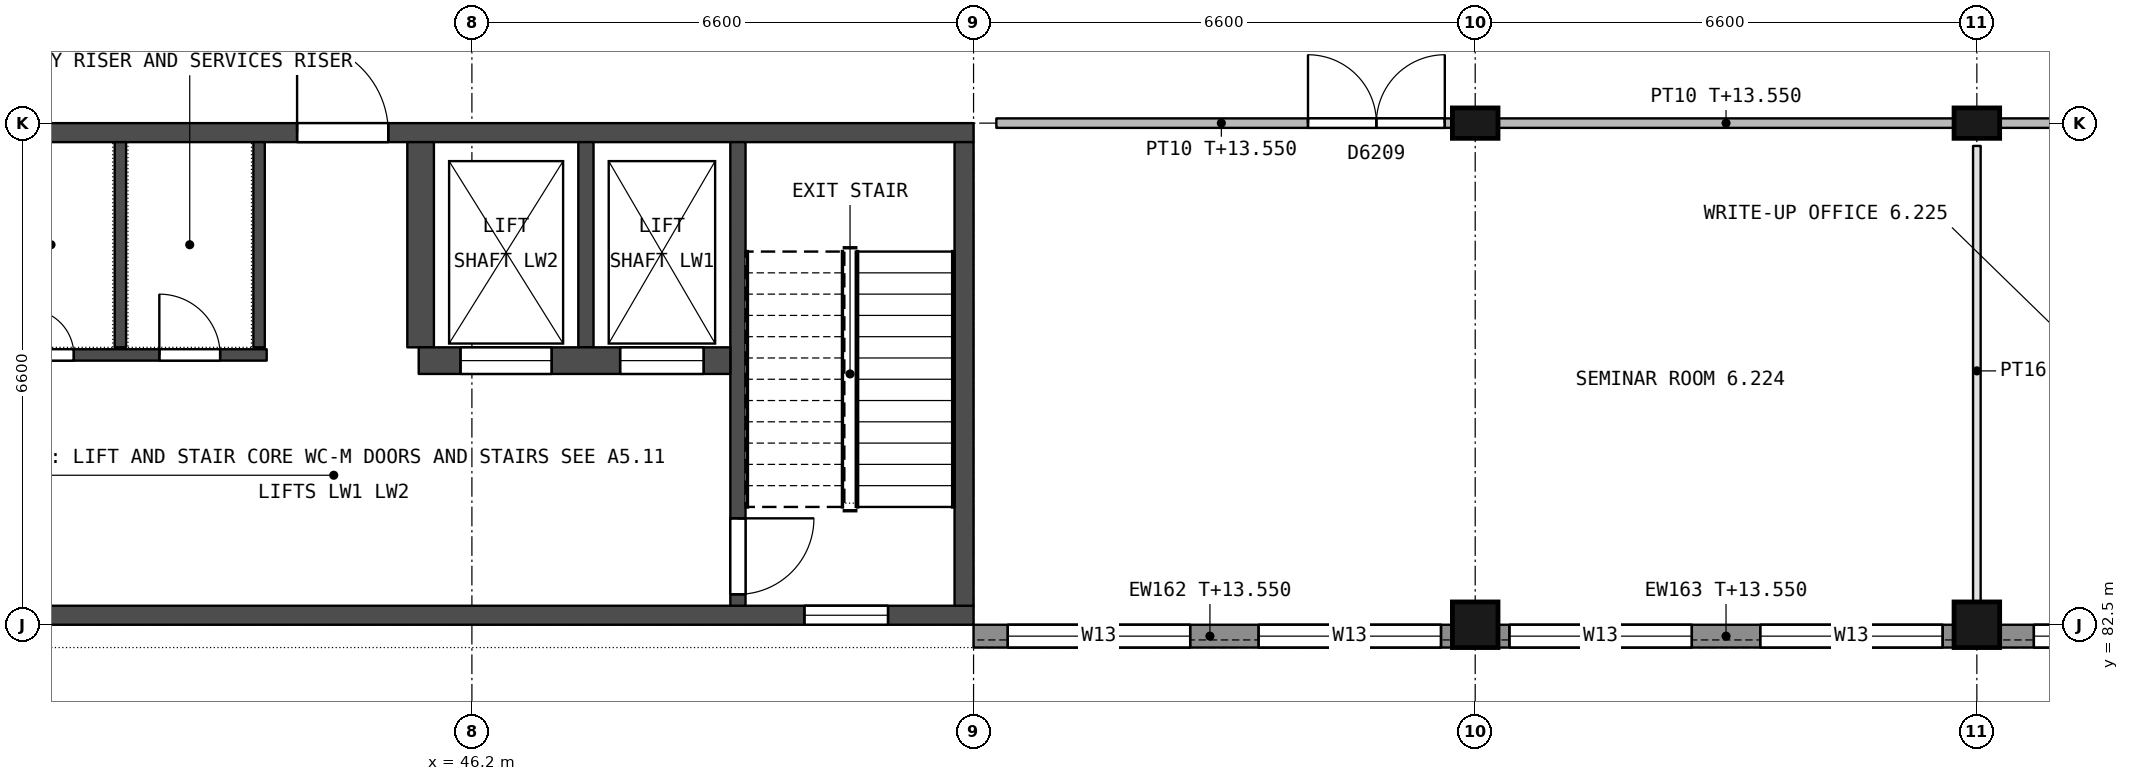
"""IFC4 building model, lengths in metres.
Left out: names, types, materials, properties, quantities, classifications, styles, units other than length and angle.
Written with IfcOpenShell. Run it as: python <this file> out.ifc"""

import sys

from ifc_helpers import new_model, si_unit, direction, frame, frame_2d, origin, origin_2d, place, context, subcontext, project, spatial, rectangle, extrude, element, fill, save


model = new_model("IFC4")
c1 = context("Model", 3, precision=1e-05, world=origin(), true_north=direction((0.0, 1.0)))
c2 = subcontext(c1, "Body", "Model", "MODEL_VIEW")
j1 = project(units=[si_unit("LENGTHUNIT", "METRE"), si_unit("PLANEANGLEUNIT", "RADIAN")], contexts=[c1])
p1 = place(None, origin())
s1 = spatial("IfcSite", under=j1, at=p1, CompositionType="ELEMENT")
p2 = place(p1, origin())
s2 = spatial("IfcBuilding", under=s1, at=p2, CompositionType="ELEMENT")
p3 = place(p2, frame((0.0, 0.0, 9.9)))
s3 = spatial("IfcBuildingStorey", under=s2, at=p3, CompositionType="ELEMENT", Elevation=9.9)
p4 = place(p3, frame((59.4, 82.5, 0.0), z_axis=(0.0, 0.0, 1.0), x_axis=(1.0, 0.0, 0.0)))
e1 = element("IfcColumn", 1, at=p4, inside=s3, PredefinedType="COLUMN", context=c2, shape_type="SweptSolid", body=[
    extrude(rectangle(XDim=0.6, YDim=0.6, at=origin_2d()), origin(), (0.0, 0.0, 1.0), 4.5),
])
p5 = place(p3, frame((59.4, 89.1, 0.0), z_axis=(0.0, 0.0, 1.0), x_axis=(1.0, 0.0, 0.0)))
e2 = element("IfcColumn", 2, at=p5, inside=s3, PredefinedType="COLUMN", context=c2, shape_type="SweptSolid", body=[
    extrude(rectangle(XDim=0.6, YDim=0.4, at=origin_2d()), origin(), (0.0, 0.0, 1.0), 4.5),
])
p6 = place(p3, frame((66.0, 82.5, 0.0), z_axis=(0.0, 0.0, 1.0), x_axis=(1.0, 0.0, 0.0)))
e3 = element("IfcColumn", 3, at=p6, inside=s3, PredefinedType="COLUMN", context=c2, shape_type="SweptSolid", body=[
    extrude(rectangle(XDim=0.6, YDim=0.6, at=origin_2d()), origin(), (0.0, 0.0, 1.0), 4.5),
])
p7 = place(p3, frame((66.0, 89.1, 0.0), z_axis=(0.0, 0.0, 1.0), x_axis=(1.0, 0.0, 0.0)))
e4 = element("IfcColumn", 4, at=p7, inside=s3, PredefinedType="COLUMN", context=c2, shape_type="SweptSolid", body=[
    extrude(rectangle(XDim=0.6, YDim=0.4, at=origin_2d()), origin(), (0.0, 0.0, 1.0), 4.5),
])
p8 = place(p3, frame((52.8, 88.975, 0.0), z_axis=(0.0, 0.0, 1.0), x_axis=(-1.0, 0.0, 0.0)))
e5 = element("IfcWall", 5, at=p8, inside=s3, PredefinedType="SHEAR", context=c2, shape_type="SweptSolid", body=[
    extrude(rectangle(XDim=13.2, YDim=0.25, at=frame_2d((6.6, 0.0))), origin(), (0.0, 0.0, 1.0), 4.25),
])
p9 = place(p8, frame((7.7, 0.0, 0.0)))
e6 = element("IfcOpeningElement", 6, at=p9, cuts=e5, PredefinedType="OPENING", context=c2, shape_type="SweptSolid", body=[
    extrude(rectangle(XDim=1.2, YDim=2.1, at=frame_2d((0.6, 1.05))), frame((0.0, 0.135, 0.0), z_axis=(0.0, -1.0, 0.0), x_axis=(1.0, 0.0, 0.0)), (0.0, 0.0, 1.0), 0.27),
])
p10 = place(p3, frame((52.8, 82.625, 0.0), z_axis=(0.0, 0.0, 1.0), x_axis=(-1.0, 0.0, 0.0)))
e7 = element("IfcWall", 7, at=p10, inside=s3, PredefinedType="SHEAR", context=c2, shape_type="SweptSolid", body=[
    extrude(rectangle(XDim=13.2, YDim=0.25, at=frame_2d((6.6, 0.0))), origin(), (0.0, 0.0, 1.0), 4.25),
])
p11 = place(p10, frame((1.125, 0.0, 0.7)))
e8 = element("IfcOpeningElement", 8, at=p11, cuts=e7, PredefinedType="OPENING", context=c2, shape_type="SweptSolid", body=[
    extrude(rectangle(XDim=1.1, YDim=1.5, at=frame_2d((0.55, 0.75))), frame((0.0, 0.135, 0.0), z_axis=(0.0, -1.0, 0.0), x_axis=(1.0, 0.0, 0.0)), (0.0, 0.0, 1.0), 0.27),
])
p12 = place(p3, frame((52.675, 88.85, 0.0), z_axis=(0.0, 0.0, 1.0), x_axis=(0.0, -1.0, 0.0)))
e9 = element("IfcWall", 9, at=p12, inside=s3, PredefinedType="SHEAR", context=c2, shape_type="SweptSolid", body=[
    extrude(rectangle(XDim=6.1, YDim=0.25, at=frame_2d((3.05, 0.0))), origin(), (0.0, 0.0, 1.0), 4.25),
])
p13 = place(p3, frame((49.7, 88.85, 0.0), z_axis=(0.0, 0.0, 1.0), x_axis=(0.0, -1.0, 0.0)))
e10 = element("IfcWall", 10, at=p13, inside=s3, PredefinedType="SHEAR", context=c2, shape_type="SweptSolid", body=[
    extrude(rectangle(XDim=6.1, YDim=0.2, at=frame_2d((3.05, 0.0))), origin(), (0.0, 0.0, 1.0), 4.25),
])
p14 = place(p13, frame((4.95, 0.0, 0.0)))
e11 = element("IfcOpeningElement", 11, at=p14, cuts=e10, PredefinedType="OPENING", context=c2, shape_type="SweptSolid", body=[
    extrude(rectangle(XDim=1.0, YDim=2.2, at=frame_2d((0.5, 1.1))), frame((0.0, 0.11, 0.0), z_axis=(0.0, -1.0, 0.0), x_axis=(1.0, 0.0, 0.0)), (0.0, 0.0, 1.0), 0.22),
])
p15 = place(p3, frame((47.7, 88.85, 0.0), z_axis=(0.0, 0.0, 1.0), x_axis=(0.0, -1.0, 0.0)))
e12 = element("IfcWall", 12, at=p15, inside=s3, PredefinedType="SHEAR", context=c2, shape_type="SweptSolid", body=[
    extrude(rectangle(XDim=2.7, YDim=0.2, at=frame_2d((1.35, 0.0))), origin(), (0.0, 0.0, 1.0), 4.25),
])
p16 = place(p3, frame((45.525, 88.85, 0.0), z_axis=(0.0, 0.0, 1.0), x_axis=(0.0, -1.0, 0.0)))
e13 = element("IfcWall", 13, at=p16, inside=s3, PredefinedType="SHEAR", context=c2, shape_type="SweptSolid", body=[
    extrude(rectangle(XDim=2.7, YDim=0.35, at=frame_2d((1.35, 0.0))), origin(), (0.0, 0.0, 1.0), 4.25),
])
p17 = place(p3, frame((49.6, 85.975, 0.0), z_axis=(0.0, 0.0, 1.0), x_axis=(-1.0, 0.0, 0.0)))
e14 = element("IfcWall", 14, at=p17, inside=s3, PredefinedType="SHEAR", context=c2, shape_type="SweptSolid", body=[
    extrude(rectangle(XDim=4.1, YDim=0.35, at=frame_2d((2.05, 0.0))), origin(), (0.0, 0.0, 1.0), 4.25),
])
p18 = place(p17, frame((0.35, 0.0, 0.0)))
e15 = element("IfcOpeningElement", 15, at=p18, cuts=e14, PredefinedType="OPENING", context=c2, shape_type="SweptSolid", body=[
    extrude(rectangle(XDim=1.1, YDim=2.2, at=frame_2d((0.55, 1.1))), frame((0.0, 0.185, 0.0), z_axis=(0.0, -1.0, 0.0), x_axis=(1.0, 0.0, 0.0)), (0.0, 0.0, 1.0), 0.37),
])
p19 = place(p17, frame((2.35, 0.0, 0.0)))
e16 = element("IfcOpeningElement", 16, at=p19, cuts=e14, PredefinedType="OPENING", context=c2, shape_type="SweptSolid", body=[
    extrude(rectangle(XDim=1.2, YDim=2.3, at=frame_2d((0.6, 1.15))), frame((0.0, 0.185, 0.0), z_axis=(0.0, -1.0, 0.0), x_axis=(1.0, 0.0, 0.0)), (0.0, 0.0, 1.0), 0.37),
])
p20 = place(p3, frame((43.4, 88.85, 0.0), z_axis=(0.0, 0.0, 1.0), x_axis=(0.0, -1.0, 0.0)))
e17 = element("IfcWall", 17, at=p20, inside=s3, PredefinedType="SHEAR", context=c2, shape_type="SweptSolid", body=[
    extrude(rectangle(XDim=2.7, YDim=0.15, at=frame_2d((1.35, 0.0))), origin(), (0.0, 0.0, 1.0), 4.25),
])
p21 = place(p3, frame((43.5, 86.05, 0.0), z_axis=(0.0, 0.0, 1.0), x_axis=(-1.0, 0.0, 0.0)))
e18 = element("IfcWall", 18, at=p21, inside=s3, PredefinedType="SHEAR", context=c2, shape_type="SweptSolid", body=[
    extrude(rectangle(XDim=3.65, YDim=0.15, at=frame_2d((1.825, 0.0))), origin(), (0.0, 0.0, 1.0), 4.25),
])
p22 = place(p21, frame((0.613, 0.0, 0.0)))
e19 = element("IfcOpeningElement", 19, at=p22, cuts=e18, PredefinedType="OPENING", context=c2, shape_type="SweptSolid", body=[
    extrude(rectangle(XDim=0.8, YDim=2.0, at=frame_2d((0.4, 1.0))), frame((0.0, 0.085, 0.0), z_axis=(0.0, -1.0, 0.0), x_axis=(1.0, 0.0, 0.0)), (0.0, 0.0, 1.0), 0.17),
])
p23 = place(p21, frame((2.538, 0.0, 0.0)))
e20 = element("IfcOpeningElement", 20, at=p23, cuts=e18, PredefinedType="OPENING", context=c2, shape_type="SweptSolid", body=[
    extrude(rectangle(XDim=0.6, YDim=2.1, at=frame_2d((0.3, 1.05))), frame((0.0, 0.085, 0.0), z_axis=(0.0, -1.0, 0.0), x_axis=(1.0, 0.0, 0.0)), (0.0, 0.0, 1.0), 0.17),
])
p24 = place(p3, frame((41.575, 88.85, 0.0), z_axis=(0.0, 0.0, 1.0), x_axis=(0.0, -1.0, 0.0)))
e21 = element("IfcWall", 21, at=p24, inside=s3, PredefinedType="SHEAR", context=c2, shape_type="SweptSolid", body=[
    extrude(rectangle(XDim=2.7, YDim=0.15, at=frame_2d((1.35, 0.0))), origin(), (0.0, 0.0, 1.0), 4.25),
])
p25 = place(p3, frame((59.1, 82.35, 0.0), z_axis=(0.0, 0.0, 1.0), x_axis=(-1.0, 0.0, 0.0)))
e22 = element("IfcWall", 22, at=p25, inside=s3, PredefinedType="STANDARD", context=c2, shape_type="SweptSolid", body=[
    extrude(rectangle(XDim=6.3, YDim=0.3, at=frame_2d((3.15, 0.0))), origin(), (0.0, 0.0, 1.0), 3.65),
])
p26 = place(p25, frame((3.45, 0.0, 0.9)))
e23 = element("IfcOpeningElement", 23, at=p26, cuts=e22, PredefinedType="OPENING", context=c2, shape_type="SweptSolid", body=[
    extrude(rectangle(XDim=2.4, YDim=1.8, at=frame_2d((1.2, 0.9))), frame((0.0, 0.16, 0.0), z_axis=(0.0, -1.0, 0.0), x_axis=(1.0, 0.0, 0.0)), (0.0, 0.0, 1.0), 0.32),
])
p27 = place(p25, frame((0.15, 0.0, 0.9)))
e24 = element("IfcOpeningElement", 24, at=p27, cuts=e22, PredefinedType="OPENING", context=c2, shape_type="SweptSolid", body=[
    extrude(rectangle(XDim=2.4, YDim=1.8, at=frame_2d((1.2, 0.9))), frame((0.0, 0.16, 0.0), z_axis=(0.0, -1.0, 0.0), x_axis=(1.0, 0.0, 0.0)), (0.0, 0.0, 1.0), 0.32),
])
p28 = place(p3, frame((65.7, 82.35, 0.0), z_axis=(0.0, 0.0, 1.0), x_axis=(-1.0, 0.0, 0.0)))
e25 = element("IfcWall", 25, at=p28, inside=s3, PredefinedType="STANDARD", context=c2, shape_type="SweptSolid", body=[
    extrude(rectangle(XDim=6.0, YDim=0.3, at=frame_2d((3.0, 0.0))), origin(), (0.0, 0.0, 1.0), 3.65),
])
p29 = place(p28, frame((3.45, 0.0, 0.9)))
e26 = element("IfcOpeningElement", 26, at=p29, cuts=e25, PredefinedType="OPENING", context=c2, shape_type="SweptSolid", body=[
    extrude(rectangle(XDim=2.4, YDim=1.8, at=frame_2d((1.2, 0.9))), frame((0.0, 0.16, 0.0), z_axis=(0.0, -1.0, 0.0), x_axis=(1.0, 0.0, 0.0)), (0.0, 0.0, 1.0), 0.32),
])
p30 = place(p28, frame((0.15, 0.0, 0.9)))
e27 = element("IfcOpeningElement", 27, at=p30, cuts=e25, PredefinedType="OPENING", context=c2, shape_type="SweptSolid", body=[
    extrude(rectangle(XDim=2.4, YDim=1.8, at=frame_2d((1.2, 0.9))), frame((0.0, 0.16, 0.0), z_axis=(0.0, -1.0, 0.0), x_axis=(1.0, 0.0, 0.0)), (0.0, 0.0, 1.0), 0.32),
])
p31 = place(p3, frame((72.3, 82.35, 0.0), z_axis=(0.0, 0.0, 1.0), x_axis=(-1.0, 0.0, 0.0)))
e28 = element("IfcWall", 28, at=p31, inside=s3, PredefinedType="STANDARD", context=c2, shape_type="SweptSolid", body=[
    extrude(rectangle(XDim=6.0, YDim=0.3, at=frame_2d((3.0, 0.0))), origin(), (0.0, 0.0, 1.0), 3.65),
])
p32 = place(p31, frame((3.75, 0.0, 0.9)))
e29 = element("IfcOpeningElement", 29, at=p32, cuts=e28, PredefinedType="OPENING", context=c2, shape_type="SweptSolid", body=[
    extrude(rectangle(XDim=1.8, YDim=1.5, at=frame_2d((0.9, 0.75))), frame((0.0, 0.16, 0.0), z_axis=(0.0, -1.0, 0.0), x_axis=(1.0, 0.0, 0.0)), (0.0, 0.0, 1.0), 0.32),
])
p33 = place(p31, frame((0.45, 0.0, 0.9)))
e30 = element("IfcOpeningElement", 30, at=p33, cuts=e28, PredefinedType="OPENING", context=c2, shape_type="SweptSolid", body=[
    extrude(rectangle(XDim=1.8, YDim=1.5, at=frame_2d((0.9, 0.75))), frame((0.0, 0.16, 0.0), z_axis=(0.0, -1.0, 0.0), x_axis=(1.0, 0.0, 0.0)), (0.0, 0.0, 1.0), 0.32),
])
p34 = place(p3, frame((53.1, 89.1, 0.0), z_axis=(0.0, 0.0, 1.0), x_axis=(1.0, 0.0, 0.0)))
e31 = element("IfcWall", 31, at=p34, inside=s3, PredefinedType="PARTITIONING", context=c2, shape_type="SweptSolid", body=[
    extrude(rectangle(XDim=6.0, YDim=0.125, at=frame_2d((3.0, 0.0))), origin(), (0.0, 0.0, 1.0), 3.65),
])
p35 = place(p34, frame((4.1, 0.0, 0.0)))
e32 = element("IfcOpeningElement", 32, at=p35, cuts=e31, PredefinedType="OPENING", context=c2, shape_type="SweptSolid", body=[
    extrude(rectangle(XDim=1.8, YDim=2.1, at=frame_2d((0.9, 1.05))), frame((0.0, 0.073, 0.0), z_axis=(0.0, -1.0, 0.0), x_axis=(1.0, 0.0, 0.0)), (0.0, 0.0, 1.0), 0.145),
])
p36 = place(p3, frame((59.7, 89.1, 0.0), z_axis=(0.0, 0.0, 1.0), x_axis=(1.0, 0.0, 0.0)))
e33 = element("IfcWall", 33, at=p36, inside=s3, PredefinedType="PARTITIONING", context=c2, shape_type="SweptSolid", body=[
    extrude(rectangle(XDim=6.0, YDim=0.125, at=frame_2d((3.0, 0.0))), origin(), (0.0, 0.0, 1.0), 3.65),
])
p37 = place(p3, frame((72.3, 89.1, 0.0), z_axis=(0.0, 0.0, 1.0), x_axis=(-1.0, 0.0, 0.0)))
e34 = element("IfcWall", 34, at=p37, inside=s3, PredefinedType="PARTITIONING", context=c2, shape_type="SweptSolid", body=[
    extrude(rectangle(XDim=6.0, YDim=0.125, at=frame_2d((3.0, 0.0))), origin(), (0.0, 0.0, 1.0), 3.65),
])
p38 = place(p37, frame((4.2, 0.0, 0.0)))
e35 = element("IfcOpeningElement", 35, at=p38, cuts=e34, PredefinedType="OPENING", context=c2, shape_type="SweptSolid", body=[
    extrude(rectangle(XDim=0.9, YDim=2.1, at=frame_2d((0.45, 1.05))), frame((0.0, 0.073, 0.0), z_axis=(0.0, -1.0, 0.0), x_axis=(1.0, 0.0, 0.0)), (0.0, 0.0, 1.0), 0.145),
])
p39 = place(p37, frame((0.9, 0.0, 0.0)))
e36 = element("IfcOpeningElement", 36, at=p39, cuts=e34, PredefinedType="OPENING", context=c2, shape_type="SweptSolid", body=[
    extrude(rectangle(XDim=0.9, YDim=2.1, at=frame_2d((0.45, 1.05))), frame((0.0, 0.073, 0.0), z_axis=(0.0, -1.0, 0.0), x_axis=(1.0, 0.0, 0.0)), (0.0, 0.0, 1.0), 0.145),
])
p40 = place(p3, frame((66.0, 82.8, 0.0), z_axis=(0.0, 0.0, 1.0), x_axis=(0.0, 1.0, 0.0)))
e37 = element("IfcWall", 37, at=p40, inside=s3, PredefinedType="PARTITIONING", context=c2, shape_type="SweptSolid", body=[
    extrude(rectangle(XDim=6.0, YDim=0.1, at=frame_2d((3.0, 0.0))), origin(), (0.0, 0.0, 1.0), 3.55),
])
p41 = place(p9, origin())
e38 = element("IfcDoor", 38, at=p41, inside=s3, OperationType="SINGLE_SWING_RIGHT", PredefinedType="DOOR", context=c2, shape_type="SweptSolid", body=[
    extrude(rectangle(XDim=1.2, YDim=2.1, at=frame_2d((0.6, 1.05))), frame((0.0, 0.025, 0.0), z_axis=(0.0, -1.0, 0.0), x_axis=(1.0, 0.0, 0.0)), (0.0, 0.0, 1.0), 0.05),
])
fill(e6, e38)
p42 = place(p22, origin())
e39 = element("IfcDoor", 39, at=p42, inside=s3, OperationType="SINGLE_SWING_RIGHT", PredefinedType="DOOR", context=c2, shape_type="SweptSolid", body=[
    extrude(rectangle(XDim=0.8, YDim=2.0, at=frame_2d((0.4, 1.0))), frame((0.0, 0.025, 0.0), z_axis=(0.0, -1.0, 0.0), x_axis=(1.0, 0.0, 0.0)), (0.0, 0.0, 1.0), 0.05),
])
fill(e19, e39)
p43 = place(p23, origin())
e40 = element("IfcDoor", 40, at=p43, inside=s3, OperationType="SINGLE_SWING_RIGHT", PredefinedType="DOOR", context=c2, shape_type="SweptSolid", body=[
    extrude(rectangle(XDim=0.6, YDim=2.1, at=frame_2d((0.3, 1.05))), frame((0.0, 0.025, 0.0), z_axis=(0.0, -1.0, 0.0), x_axis=(1.0, 0.0, 0.0)), (0.0, 0.0, 1.0), 0.05),
])
fill(e20, e40)
p44 = place(p14, origin())
e41 = element("IfcDoor", 41, at=p44, inside=s3, OperationType="SINGLE_SWING_LEFT", PredefinedType="DOOR", context=c2, shape_type="SweptSolid", body=[
    extrude(rectangle(XDim=1.0, YDim=2.2, at=frame_2d((0.5, 1.1))), frame((0.0, 0.025, 0.0), z_axis=(0.0, -1.0, 0.0), x_axis=(1.0, 0.0, 0.0)), (0.0, 0.0, 1.0), 0.05),
])
fill(e11, e41)
p45 = place(p18, origin())
e42 = element("IfcDoor", 42, at=p45, inside=s3, OperationType="DOUBLE_DOOR_SLIDING", PredefinedType="NOTDEFINED", context=c2, shape_type="SweptSolid", body=[
    extrude(rectangle(XDim=1.1, YDim=2.2, at=frame_2d((0.55, 1.1))), frame((0.0, 0.025, 0.0), z_axis=(0.0, -1.0, 0.0), x_axis=(1.0, 0.0, 0.0)), (0.0, 0.0, 1.0), 0.05),
])
fill(e15, e42)
p46 = place(p19, origin())
e43 = element("IfcDoor", 43, at=p46, inside=s3, OperationType="DOUBLE_DOOR_SLIDING", PredefinedType="NOTDEFINED", context=c2, shape_type="SweptSolid", body=[
    extrude(rectangle(XDim=1.2, YDim=2.3, at=frame_2d((0.6, 1.15))), frame((0.0, 0.025, 0.0), z_axis=(0.0, -1.0, 0.0), x_axis=(1.0, 0.0, 0.0)), (0.0, 0.0, 1.0), 0.05),
])
fill(e16, e43)
p47 = place(p11, origin())
e44 = element("IfcWindow", 44, at=p47, inside=s3, PartitioningType="SINGLE_PANEL", PredefinedType="WINDOW", context=c2, shape_type="SweptSolid", body=[
    extrude(rectangle(XDim=1.1, YDim=1.5, at=frame_2d((0.55, 0.75))), frame((0.0, 0.03, 0.0), z_axis=(0.0, -1.0, 0.0), x_axis=(1.0, 0.0, 0.0)), (0.0, 0.0, 1.0), 0.06),
])
fill(e8, e44)
p48 = place(p26, origin())
e45 = element("IfcWindow", 45, at=p48, inside=s3, PartitioningType="SINGLE_PANEL", PredefinedType="WINDOW", context=c2, shape_type="SweptSolid", body=[
    extrude(rectangle(XDim=2.4, YDim=1.8, at=frame_2d((1.2, 0.9))), frame((0.0, 0.03, 0.0), z_axis=(0.0, -1.0, 0.0), x_axis=(1.0, 0.0, 0.0)), (0.0, 0.0, 1.0), 0.06),
])
fill(e23, e45)
p49 = place(p27, origin())
e46 = element("IfcWindow", 46, at=p49, inside=s3, PartitioningType="SINGLE_PANEL", PredefinedType="WINDOW", context=c2, shape_type="SweptSolid", body=[
    extrude(rectangle(XDim=2.4, YDim=1.8, at=frame_2d((1.2, 0.9))), frame((0.0, 0.03, 0.0), z_axis=(0.0, -1.0, 0.0), x_axis=(1.0, 0.0, 0.0)), (0.0, 0.0, 1.0), 0.06),
])
fill(e24, e46)
p50 = place(p29, origin())
e47 = element("IfcWindow", 47, at=p50, inside=s3, PartitioningType="SINGLE_PANEL", PredefinedType="WINDOW", context=c2, shape_type="SweptSolid", body=[
    extrude(rectangle(XDim=2.4, YDim=1.8, at=frame_2d((1.2, 0.9))), frame((0.0, 0.03, 0.0), z_axis=(0.0, -1.0, 0.0), x_axis=(1.0, 0.0, 0.0)), (0.0, 0.0, 1.0), 0.06),
])
fill(e26, e47)
p51 = place(p30, origin())
e48 = element("IfcWindow", 48, at=p51, inside=s3, PartitioningType="SINGLE_PANEL", PredefinedType="WINDOW", context=c2, shape_type="SweptSolid", body=[
    extrude(rectangle(XDim=2.4, YDim=1.8, at=frame_2d((1.2, 0.9))), frame((0.0, 0.03, 0.0), z_axis=(0.0, -1.0, 0.0), x_axis=(1.0, 0.0, 0.0)), (0.0, 0.0, 1.0), 0.06),
])
fill(e27, e48)
p52 = place(p32, origin())
e49 = element("IfcWindow", 49, at=p52, inside=s3, PartitioningType="SINGLE_PANEL", PredefinedType="WINDOW", context=c2, shape_type="SweptSolid", body=[
    extrude(rectangle(XDim=1.8, YDim=1.5, at=frame_2d((0.9, 0.75))), frame((0.0, 0.03, 0.0), z_axis=(0.0, -1.0, 0.0), x_axis=(1.0, 0.0, 0.0)), (0.0, 0.0, 1.0), 0.06),
])
fill(e29, e49)
p53 = place(p35, origin())
e50 = element("IfcDoor", 50, at=p53, inside=s3, OperationType="DOUBLE_DOOR_SINGLE_SWING", PredefinedType="DOOR", context=c2, shape_type="SweptSolid", body=[
    extrude(rectangle(XDim=1.8, YDim=2.1, at=frame_2d((0.9, 1.05))), frame((0.0, 0.025, 0.0), z_axis=(0.0, -1.0, 0.0), x_axis=(1.0, 0.0, 0.0)), (0.0, 0.0, 1.0), 0.05),
])
fill(e32, e50)
save(model, sys.argv[1])
